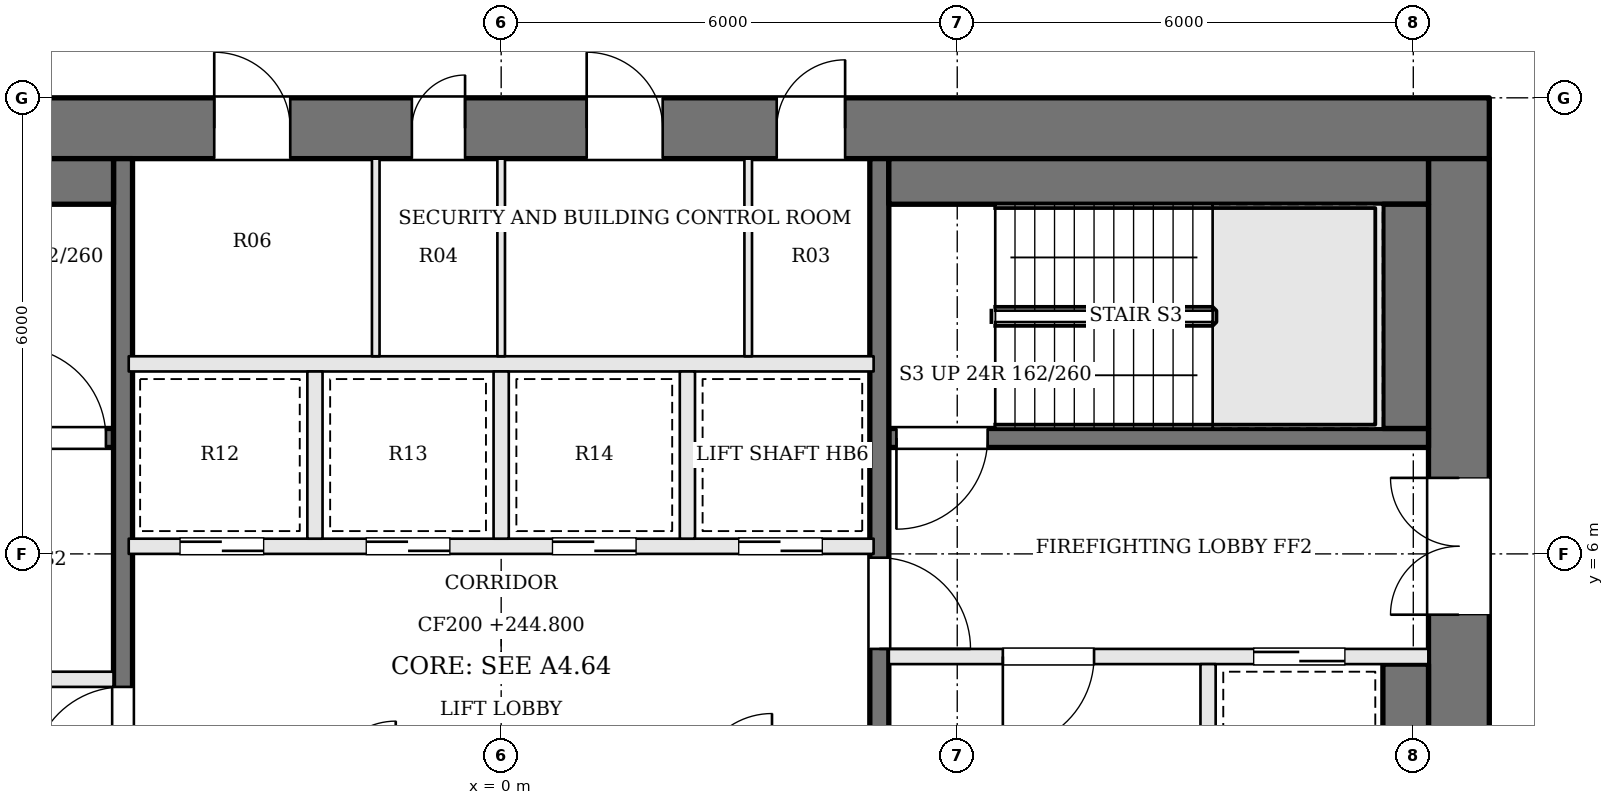
"""IFC4 building model, lengths in metres.
Left out: names, types, materials, properties, quantities, classifications, styles, units other than length and angle.
Written with IfcOpenShell. Run it as: python <this file> out.ifc"""

import sys

from ifc_helpers import new_model, si_unit, direction, frame, frame_2d, origin, place, context, subcontext, project, spatial, rectangle, extrude, element, fill, save


model = new_model("IFC4")
c1 = context("Model", 3, precision=1e-05, world=origin(), true_north=direction((0.0, 1.0)))
c2 = subcontext(c1, "Body", "Model", "MODEL_VIEW")
j1 = project(units=[si_unit("LENGTHUNIT", "METRE"), si_unit("PLANEANGLEUNIT", "RADIAN")], contexts=[c1])
p1 = place(None, origin())
s1 = spatial("IfcSite", under=j1, at=p1, CompositionType="ELEMENT")
p2 = place(p1, origin())
s2 = spatial("IfcBuilding", under=s1, at=p2, CompositionType="ELEMENT")
p3 = place(p2, frame((0.0, 0.0, 244.8)))
s3 = spatial("IfcBuildingStorey", under=s2, at=p3, CompositionType="ELEMENT", Elevation=244.8)
p4 = place(p3, frame((-13.0, 11.6, 0.0), z_axis=(0.0, 0.0, 1.0), x_axis=(1.0, 0.0, 0.0)))
e1 = element("IfcWall", 1, at=p4, inside=s3, PredefinedType="SHEAR", context=c2, shape_type="SweptSolid", body=[
    extrude(rectangle(XDim=26.0, YDim=0.8, at=frame_2d((13.0, 0.0))), origin(), (0.0, 0.0, 1.0), 3.9),
])
p5 = place(p4, frame((9.225, 0.0, 0.0)))
e2 = element("IfcOpeningElement", 2, at=p5, cuts=e1, PredefinedType="OPENING", context=c2, shape_type="SweptSolid", body=[
    extrude(rectangle(XDim=1.0, YDim=2.1, at=frame_2d((0.5, 1.05))), frame((0.0, 0.41, 0.0), z_axis=(0.0, -1.0, 0.0), x_axis=(1.0, 0.0, 0.0)), (0.0, 0.0, 1.0), 0.82),
])
p6 = place(p4, frame((11.825, 0.0, 0.0)))
e3 = element("IfcOpeningElement", 3, at=p6, cuts=e1, PredefinedType="OPENING", context=c2, shape_type="SweptSolid", body=[
    extrude(rectangle(XDim=0.7, YDim=2.1, at=frame_2d((0.35, 1.05))), frame((0.0, 0.41, 0.0), z_axis=(0.0, -1.0, 0.0), x_axis=(1.0, 0.0, 0.0)), (0.0, 0.0, 1.0), 0.82),
])
p7 = place(p4, frame((14.125, 0.0, 0.0)))
e4 = element("IfcOpeningElement", 4, at=p7, cuts=e1, PredefinedType="OPENING", context=c2, shape_type="SweptSolid", body=[
    extrude(rectangle(XDim=1.0, YDim=2.1, at=frame_2d((0.5, 1.05))), frame((0.0, 0.41, 0.0), z_axis=(0.0, -1.0, 0.0), x_axis=(1.0, 0.0, 0.0)), (0.0, 0.0, 1.0), 0.82),
])
p8 = place(p4, frame((16.625, 0.0, 0.0)))
e5 = element("IfcOpeningElement", 5, at=p8, cuts=e1, PredefinedType="OPENING", context=c2, shape_type="SweptSolid", body=[
    extrude(rectangle(XDim=0.9, YDim=2.1, at=frame_2d((0.45, 1.05))), frame((0.0, 0.41, 0.0), z_axis=(0.0, -1.0, 0.0), x_axis=(1.0, 0.0, 0.0)), (0.0, 0.0, 1.0), 0.82),
])
p9 = place(p3, frame((12.6, -2.2, 0.0), z_axis=(0.0, 0.0, 1.0), x_axis=(0.0, 1.0, 0.0)))
e6 = element("IfcWall", 6, at=p9, inside=s3, PredefinedType="SHEAR", context=c2, shape_type="SweptSolid", body=[
    extrude(rectangle(XDim=13.4, YDim=0.8, at=frame_2d((6.7, 0.0))), origin(), (0.0, 0.0, 1.0), 3.9),
])
p10 = place(p9, frame((7.4, 0.0, 0.0)))
e7 = element("IfcOpeningElement", 7, at=p10, cuts=e6, PredefinedType="OPENING", context=c2, shape_type="SweptSolid", body=[
    extrude(rectangle(XDim=1.8, YDim=2.1, at=frame_2d((0.9, 1.05))), frame((0.0, 0.41, 0.0), z_axis=(0.0, -1.0, 0.0), x_axis=(1.0, 0.0, 0.0)), (0.0, 0.0, 1.0), 0.82),
])
p11 = place(p3, frame((12.2, 7.525, 0.0), z_axis=(0.0, 0.0, 1.0), x_axis=(-1.0, 0.0, 0.0)))
e8 = element("IfcWall", 8, at=p11, inside=s3, PredefinedType="SOLIDWALL", context=c2, shape_type="SweptSolid", body=[
    extrude(rectangle(XDim=7.1, YDim=0.25, at=frame_2d((3.55, 0.0))), origin(), (0.0, 0.0, 1.0), 3.7),
])
p12 = place(p11, frame((5.8, 0.0, 0.0)))
e9 = element("IfcOpeningElement", 9, at=p12, cuts=e8, PredefinedType="OPENING", context=c2, shape_type="SweptSolid", body=[
    extrude(rectangle(XDim=1.2, YDim=2.1, at=frame_2d((0.6, 1.05))), frame((0.0, 0.135, 0.0), z_axis=(0.0, -1.0, 0.0), x_axis=(1.0, 0.0, 0.0)), (0.0, 0.0, 1.0), 0.27),
])
p13 = place(p3, frame((-12.2, 4.35, 0.0), z_axis=(0.0, 0.0, 1.0), x_axis=(1.0, 0.0, 0.0)))
e10 = element("IfcWall", 10, at=p13, inside=s3, PredefinedType="SOLIDWALL", context=c2, shape_type="SweptSolid", body=[
    extrude(rectangle(XDim=7.1, YDim=0.2, at=frame_2d((3.55, 0.0))), origin(), (0.0, 0.0, 1.0), 3.7),
])
p14 = place(p13, frame((4.4, 0.0, 0.0)))
e11 = element("IfcOpeningElement", 11, at=p14, cuts=e10, PredefinedType="OPENING", context=c2, shape_type="SweptSolid", body=[
    extrude(rectangle(XDim=1.2, YDim=2.1, at=frame_2d((0.6, 1.05))), frame((0.0, 0.11, 0.0), z_axis=(0.0, -1.0, 0.0), x_axis=(1.0, 0.0, 0.0)), (0.0, 0.0, 1.0), 0.22),
])
p15 = place(p13, frame((1.1, 0.0, 0.0)))
e12 = element("IfcOpeningElement", 12, at=p15, cuts=e10, PredefinedType="OPENING", context=c2, shape_type="SweptSolid", body=[
    extrude(rectangle(XDim=1.2, YDim=2.1, at=frame_2d((0.6, 1.05))), frame((0.0, 0.11, 0.0), z_axis=(0.0, -1.0, 0.0), x_axis=(1.0, 0.0, 0.0)), (0.0, 0.0, 1.0), 0.22),
])
p16 = place(p3, frame((12.2, 4.65, 0.0), z_axis=(0.0, 0.0, 1.0), x_axis=(-1.0, 0.0, 0.0)))
e13 = element("IfcWall", 13, at=p16, inside=s3, PredefinedType="SOLIDWALL", context=c2, shape_type="SweptSolid", body=[
    extrude(rectangle(XDim=7.1, YDim=0.2, at=frame_2d((3.55, 0.0))), origin(), (0.0, 0.0, 1.0), 3.7),
])
p17 = place(p16, frame((4.4, 0.0, 0.0)))
e14 = element("IfcOpeningElement", 14, at=p17, cuts=e13, PredefinedType="OPENING", context=c2, shape_type="SweptSolid", body=[
    extrude(rectangle(XDim=1.2, YDim=2.1, at=frame_2d((0.6, 1.05))), frame((0.0, 0.11, 0.0), z_axis=(0.0, -1.0, 0.0), x_axis=(1.0, 0.0, 0.0)), (0.0, 0.0, 1.0), 0.22),
])
p18 = place(p16, frame((1.1, 0.0, 0.0)))
e15 = element("IfcOpeningElement", 15, at=p18, cuts=e13, PredefinedType="OPENING", context=c2, shape_type="SweptSolid", body=[
    extrude(rectangle(XDim=1.2, YDim=2.1, at=frame_2d((0.6, 1.05))), frame((0.0, 0.11, 0.0), z_axis=(0.0, -1.0, 0.0), x_axis=(1.0, 0.0, 0.0)), (0.0, 0.0, 1.0), 0.22),
])
p19 = place(p3, frame((-12.2, 7.525, 0.0), z_axis=(0.0, 0.0, 1.0), x_axis=(1.0, 0.0, 0.0)))
e16 = element("IfcWall", 16, at=p19, inside=s3, PredefinedType="SOLIDWALL", context=c2, shape_type="SweptSolid", body=[
    extrude(rectangle(XDim=7.1, YDim=0.25, at=frame_2d((3.55, 0.0))), origin(), (0.0, 0.0, 1.0), 3.7),
])
p20 = place(p19, frame((5.8, 0.0, 0.0)))
e17 = element("IfcOpeningElement", 17, at=p20, cuts=e16, PredefinedType="OPENING", context=c2, shape_type="SweptSolid", body=[
    extrude(rectangle(XDim=1.2, YDim=2.1, at=frame_2d((0.6, 1.05))), frame((0.0, 0.135, 0.0), z_axis=(0.0, -1.0, 0.0), x_axis=(1.0, 0.0, 0.0)), (0.0, 0.0, 1.0), 0.27),
])
p21 = place(p3, frame((9.3, 4.55, 0.0), z_axis=(0.0, 0.0, 1.0), x_axis=(0.0, -1.0, 0.0)))
e18 = element("IfcWall", 18, at=p21, inside=s3, PredefinedType="SOLIDWALL", context=c2, shape_type="SweptSolid", body=[
    extrude(rectangle(XDim=3.0, YDim=0.2, at=frame_2d((1.5, 0.0))), origin(), (0.0, 0.0, 1.0), 3.7),
])
p22 = place(p3, frame((-4.975, -2.2, 0.0), z_axis=(0.0, 0.0, 1.0), x_axis=(0.0, 1.0, 0.0)))
e19 = element("IfcWall", 19, at=p22, inside=s3, PredefinedType="SOLIDWALL", context=c2, shape_type="SweptSolid", body=[
    extrude(rectangle(XDim=13.4, YDim=0.25, at=frame_2d((6.7, 0.0))), origin(), (0.0, 0.0, 1.0), 3.7),
])
p23 = place(p22, frame((5.25, 0.0, 0.0)))
e20 = element("IfcOpeningElement", 20, at=p23, cuts=e19, PredefinedType="OPENING", context=c2, shape_type="SweptSolid", body=[
    extrude(rectangle(XDim=1.2, YDim=2.1, at=frame_2d((0.6, 1.05))), frame((0.0, 0.135, 0.0), z_axis=(0.0, -1.0, 0.0), x_axis=(1.0, 0.0, 0.0)), (0.0, 0.0, 1.0), 0.27),
])
p24 = place(p3, frame((4.975, 11.2, 0.0), z_axis=(0.0, 0.0, 1.0), x_axis=(0.0, -1.0, 0.0)))
e21 = element("IfcWall", 21, at=p24, inside=s3, PredefinedType="SOLIDWALL", context=c2, shape_type="SweptSolid", body=[
    extrude(rectangle(XDim=13.4, YDim=0.25, at=frame_2d((6.7, 0.0))), origin(), (0.0, 0.0, 1.0), 3.7),
])
p25 = place(p24, frame((5.25, 0.0, 0.0)))
e22 = element("IfcOpeningElement", 22, at=p25, cuts=e21, PredefinedType="OPENING", context=c2, shape_type="SweptSolid", body=[
    extrude(rectangle(XDim=1.2, YDim=2.1, at=frame_2d((0.6, 1.05))), frame((0.0, 0.135, 0.0), z_axis=(0.0, -1.0, 0.0), x_axis=(1.0, 0.0, 0.0)), (0.0, 0.0, 1.0), 0.27),
])
for number, where, z_axis, x_axis in (
    (23, (-12.2, 10.9, 0.0), (0.0, 0.0, 1.0), (1.0, 0.0, 0.0)),
    (24, (12.2, 10.9, 0.0), (0.0, 0.0, 1.0), (-1.0, 0.0, 0.0)),
):
    element("IfcWall", number, at=place(p3, frame(where, z_axis=z_axis, x_axis=x_axis)), inside=s3, PredefinedType="SOLIDWALL", context=c2, shape_type="SweptSolid", body=[
        extrude(rectangle(XDim=7.1, YDim=0.6, at=frame_2d((3.55, 0.0))), origin(), (0.0, 0.0, 1.0), 3.7),
    ])
p26 = place(p3, frame((11.9, 10.6, 0.0), z_axis=(0.0, 0.0, 1.0), x_axis=(0.0, -1.0, 0.0)))
e25 = element("IfcWall", 25, at=p26, inside=s3, PredefinedType="SOLIDWALL", context=c2, shape_type="SweptSolid", body=[
    extrude(rectangle(XDim=2.95, YDim=0.6, at=frame_2d((1.475, 0.0))), origin(), (0.0, 0.0, 1.0), 3.7),
])
p27 = place(p3, frame((11.9, 4.55, 0.0), z_axis=(0.0, 0.0, 1.0), x_axis=(0.0, -1.0, 0.0)))
e26 = element("IfcWall", 26, at=p27, inside=s3, PredefinedType="SOLIDWALL", context=c2, shape_type="SweptSolid", body=[
    extrude(rectangle(XDim=3.0, YDim=0.6, at=frame_2d((1.5, 0.0))), origin(), (0.0, 0.0, 1.0), 3.7),
])
p28 = place(p3, frame((-4.9, 6.1, 0.0), z_axis=(0.0, 0.0, 1.0), x_axis=(1.0, 0.0, 0.0)))
e27 = element("IfcWall", 27, at=p28, inside=s3, PredefinedType="SOLIDWALL", context=c2, shape_type="SweptSolid", body=[
    extrude(rectangle(XDim=9.8, YDim=0.2, at=frame_2d((4.9, 0.0))), origin(), (0.0, 0.0, 1.0), 3.7),
])
p29 = place(p28, frame((0.675, 0.0, 0.0)))
e28 = element("IfcOpeningElement", 28, at=p29, cuts=e27, PredefinedType="OPENING", context=c2, shape_type="SweptSolid", body=[
    extrude(rectangle(XDim=1.1, YDim=2.1, at=frame_2d((0.55, 1.05))), frame((0.0, 0.11, 0.0), z_axis=(0.0, -1.0, 0.0), x_axis=(1.0, 0.0, 0.0)), (0.0, 0.0, 1.0), 0.22),
])
p30 = place(p28, frame((3.125, 0.0, 0.0)))
e29 = element("IfcOpeningElement", 29, at=p30, cuts=e27, PredefinedType="OPENING", context=c2, shape_type="SweptSolid", body=[
    extrude(rectangle(XDim=1.1, YDim=2.1, at=frame_2d((0.55, 1.05))), frame((0.0, 0.11, 0.0), z_axis=(0.0, -1.0, 0.0), x_axis=(1.0, 0.0, 0.0)), (0.0, 0.0, 1.0), 0.22),
])
p31 = place(p28, frame((5.575, 0.0, 0.0)))
e30 = element("IfcOpeningElement", 30, at=p31, cuts=e27, PredefinedType="OPENING", context=c2, shape_type="SweptSolid", body=[
    extrude(rectangle(XDim=1.1, YDim=2.1, at=frame_2d((0.55, 1.05))), frame((0.0, 0.11, 0.0), z_axis=(0.0, -1.0, 0.0), x_axis=(1.0, 0.0, 0.0)), (0.0, 0.0, 1.0), 0.22),
])
p32 = place(p28, frame((8.025, 0.0, 0.0)))
e31 = element("IfcOpeningElement", 31, at=p32, cuts=e27, PredefinedType="OPENING", context=c2, shape_type="SweptSolid", body=[
    extrude(rectangle(XDim=1.1, YDim=2.1, at=frame_2d((0.55, 1.05))), frame((0.0, 0.11, 0.0), z_axis=(0.0, -1.0, 0.0), x_axis=(1.0, 0.0, 0.0)), (0.0, 0.0, 1.0), 0.22),
])
p33 = place(p3, frame((-4.9, 8.5, 0.0), z_axis=(0.0, 0.0, 1.0), x_axis=(1.0, 0.0, 0.0)))
e32 = element("IfcWall", 32, at=p33, inside=s3, PredefinedType="SOLIDWALL", context=c2, shape_type="SweptSolid", body=[
    extrude(rectangle(XDim=9.8, YDim=0.2, at=frame_2d((4.9, 0.0))), origin(), (0.0, 0.0, 1.0), 3.7),
])
for number, where, z_axis, x_axis in (
    (33, (-2.45, 6.2, 0.0), (0.0, 0.0, 1.0), (0.0, 1.0, 0.0)),
    (34, (0.0, 6.2, 0.0), (0.0, 0.0, 1.0), (0.0, 1.0, 0.0)),
    (35, (2.45, 6.2, 0.0), (0.0, 0.0, 1.0), (0.0, 1.0, 0.0)),
):
    element("IfcWall", number, at=place(p3, frame(where, z_axis=z_axis, x_axis=x_axis)), inside=s3, PredefinedType="SOLIDWALL", context=c2, shape_type="SweptSolid", body=[
        extrude(rectangle(XDim=2.2, YDim=0.2, at=frame_2d((1.1, 0.0))), origin(), (0.0, 0.0, 1.0), 3.7),
    ])
for number, where, z_axis, x_axis in (
    (36, (-1.65, 8.6, 0.0), (0.0, 0.0, 1.0), (0.0, 1.0, 0.0)),
    (37, (0.0, 8.6, 0.0), (0.0, 0.0, 1.0), (0.0, 1.0, 0.0)),
    (38, (3.25, 8.6, 0.0), (0.0, 0.0, 1.0), (0.0, 1.0, 0.0)),
):
    element("IfcWall", number, at=place(p3, frame(where, z_axis=z_axis, x_axis=x_axis)), inside=s3, PredefinedType="PARTITIONING", context=c2, shape_type="SweptSolid", body=[
        extrude(rectangle(XDim=2.6, YDim=0.1, at=frame_2d((1.3, 0.0))), origin(), (0.0, 0.0, 1.0), 3.7),
    ])
p34 = place(p10, origin())
e39 = element("IfcDoor", 39, at=p34, inside=s3, OperationType="DOUBLE_DOOR_SINGLE_SWING", PredefinedType="DOOR", context=c2, shape_type="SweptSolid", body=[
    extrude(rectangle(XDim=1.8, YDim=2.1, at=frame_2d((0.9, 1.05))), frame((0.0, 0.025, 0.0), z_axis=(0.0, -1.0, 0.0), x_axis=(1.0, 0.0, 0.0)), (0.0, 0.0, 1.0), 0.05),
])
fill(e7, e39)
p35 = place(p23, origin())
e40 = element("IfcDoor", 40, at=p35, inside=s3, OperationType="SINGLE_SWING_LEFT", PredefinedType="DOOR", context=c2, shape_type="SweptSolid", body=[
    extrude(rectangle(XDim=1.2, YDim=2.1, at=frame_2d((0.6, 1.05))), frame((0.0, 0.025, 0.0), z_axis=(0.0, -1.0, 0.0), x_axis=(1.0, 0.0, 0.0)), (0.0, 0.0, 1.0), 0.05),
])
fill(e20, e40)
p36 = place(p25, origin())
e41 = element("IfcDoor", 41, at=p36, inside=s3, OperationType="SINGLE_SWING_RIGHT", PredefinedType="DOOR", context=c2, shape_type="SweptSolid", body=[
    extrude(rectangle(XDim=1.2, YDim=2.1, at=frame_2d((0.6, 1.05))), frame((0.0, 0.025, 0.0), z_axis=(0.0, -1.0, 0.0), x_axis=(1.0, 0.0, 0.0)), (0.0, 0.0, 1.0), 0.05),
])
fill(e22, e41)
p37 = place(p17, origin())
e42 = element("IfcDoor", 42, at=p37, inside=s3, OperationType="SINGLE_SWING_RIGHT", PredefinedType="DOOR", context=c2, shape_type="SweptSolid", body=[
    extrude(rectangle(XDim=1.2, YDim=2.1, at=frame_2d((0.6, 1.05))), frame((0.0, 0.025, 0.0), z_axis=(0.0, -1.0, 0.0), x_axis=(1.0, 0.0, 0.0)), (0.0, 0.0, 1.0), 0.05),
])
fill(e14, e42)
p38 = place(p12, origin())
e43 = element("IfcDoor", 43, at=p38, inside=s3, OperationType="SINGLE_SWING_RIGHT", PredefinedType="DOOR", context=c2, shape_type="SweptSolid", body=[
    extrude(rectangle(XDim=1.2, YDim=2.1, at=frame_2d((0.6, 1.05))), frame((0.0, 0.025, 0.0), z_axis=(0.0, -1.0, 0.0), x_axis=(1.0, 0.0, 0.0)), (0.0, 0.0, 1.0), 0.05),
])
fill(e9, e43)
p39 = place(p20, origin())
e44 = element("IfcDoor", 44, at=p39, inside=s3, OperationType="SINGLE_SWING_LEFT", PredefinedType="DOOR", context=c2, shape_type="SweptSolid", body=[
    extrude(rectangle(XDim=1.2, YDim=2.1, at=frame_2d((0.6, 1.05))), frame((0.0, 0.025, 0.0), z_axis=(0.0, -1.0, 0.0), x_axis=(1.0, 0.0, 0.0)), (0.0, 0.0, 1.0), 0.05),
])
fill(e17, e44)
p40 = place(p18, origin())
e45 = element("IfcDoor", 45, at=p40, inside=s3, OperationType="SLIDING_TO_RIGHT", PredefinedType="DOOR", context=c2, shape_type="SweptSolid", body=[
    extrude(rectangle(XDim=1.2, YDim=2.1, at=frame_2d((0.6, 1.05))), frame((0.0, 0.025, 0.0), z_axis=(0.0, -1.0, 0.0), x_axis=(1.0, 0.0, 0.0)), (0.0, 0.0, 1.0), 0.05),
])
fill(e15, e45)
p41 = place(p29, origin())
e46 = element("IfcDoor", 46, at=p41, inside=s3, OperationType="SLIDING_TO_RIGHT", PredefinedType="DOOR", context=c2, shape_type="SweptSolid", body=[
    extrude(rectangle(XDim=1.1, YDim=2.1, at=frame_2d((0.55, 1.05))), frame((0.0, 0.025, 0.0), z_axis=(0.0, -1.0, 0.0), x_axis=(1.0, 0.0, 0.0)), (0.0, 0.0, 1.0), 0.05),
])
fill(e28, e46)
p42 = place(p30, origin())
e47 = element("IfcDoor", 47, at=p42, inside=s3, OperationType="SLIDING_TO_LEFT", PredefinedType="DOOR", context=c2, shape_type="SweptSolid", body=[
    extrude(rectangle(XDim=1.1, YDim=2.1, at=frame_2d((0.55, 1.05))), frame((0.0, 0.025, 0.0), z_axis=(0.0, -1.0, 0.0), x_axis=(1.0, 0.0, 0.0)), (0.0, 0.0, 1.0), 0.05),
])
fill(e29, e47)
p43 = place(p31, origin())
e48 = element("IfcDoor", 48, at=p43, inside=s3, OperationType="SLIDING_TO_RIGHT", PredefinedType="DOOR", context=c2, shape_type="SweptSolid", body=[
    extrude(rectangle(XDim=1.1, YDim=2.1, at=frame_2d((0.55, 1.05))), frame((0.0, 0.025, 0.0), z_axis=(0.0, -1.0, 0.0), x_axis=(1.0, 0.0, 0.0)), (0.0, 0.0, 1.0), 0.05),
])
fill(e30, e48)
p44 = place(p32, origin())
e49 = element("IfcDoor", 49, at=p44, inside=s3, OperationType="SLIDING_TO_LEFT", PredefinedType="DOOR", context=c2, shape_type="SweptSolid", body=[
    extrude(rectangle(XDim=1.1, YDim=2.1, at=frame_2d((0.55, 1.05))), frame((0.0, 0.025, 0.0), z_axis=(0.0, -1.0, 0.0), x_axis=(1.0, 0.0, 0.0)), (0.0, 0.0, 1.0), 0.05),
])
fill(e31, e49)
p45 = place(p5, origin())
e50 = element("IfcDoor", 50, at=p45, inside=s3, OperationType="SINGLE_SWING_LEFT", PredefinedType="DOOR", context=c2, shape_type="SweptSolid", body=[
    extrude(rectangle(XDim=1.0, YDim=2.1, at=frame_2d((0.5, 1.05))), frame((0.0, 0.025, 0.0), z_axis=(0.0, -1.0, 0.0), x_axis=(1.0, 0.0, 0.0)), (0.0, 0.0, 1.0), 0.05),
])
fill(e2, e50)
p46 = place(p6, origin())
e51 = element("IfcDoor", 51, at=p46, inside=s3, OperationType="SINGLE_SWING_RIGHT", PredefinedType="DOOR", context=c2, shape_type="SweptSolid", body=[
    extrude(rectangle(XDim=0.7, YDim=2.1, at=frame_2d((0.35, 1.05))), frame((0.0, 0.025, 0.0), z_axis=(0.0, -1.0, 0.0), x_axis=(1.0, 0.0, 0.0)), (0.0, 0.0, 1.0), 0.05),
])
fill(e3, e51)
p47 = place(p7, origin())
e52 = element("IfcDoor", 52, at=p47, inside=s3, OperationType="SINGLE_SWING_LEFT", PredefinedType="DOOR", context=c2, shape_type="SweptSolid", body=[
    extrude(rectangle(XDim=1.0, YDim=2.1, at=frame_2d((0.5, 1.05))), frame((0.0, 0.025, 0.0), z_axis=(0.0, -1.0, 0.0), x_axis=(1.0, 0.0, 0.0)), (0.0, 0.0, 1.0), 0.05),
])
fill(e4, e52)
p48 = place(p8, origin())
e53 = element("IfcDoor", 53, at=p48, inside=s3, OperationType="SINGLE_SWING_RIGHT", PredefinedType="DOOR", context=c2, shape_type="SweptSolid", body=[
    extrude(rectangle(XDim=0.9, YDim=2.1, at=frame_2d((0.45, 1.05))), frame((0.0, 0.025, 0.0), z_axis=(0.0, -1.0, 0.0), x_axis=(1.0, 0.0, 0.0)), (0.0, 0.0, 1.0), 0.05),
])
fill(e5, e53)
save(model, sys.argv[1])
